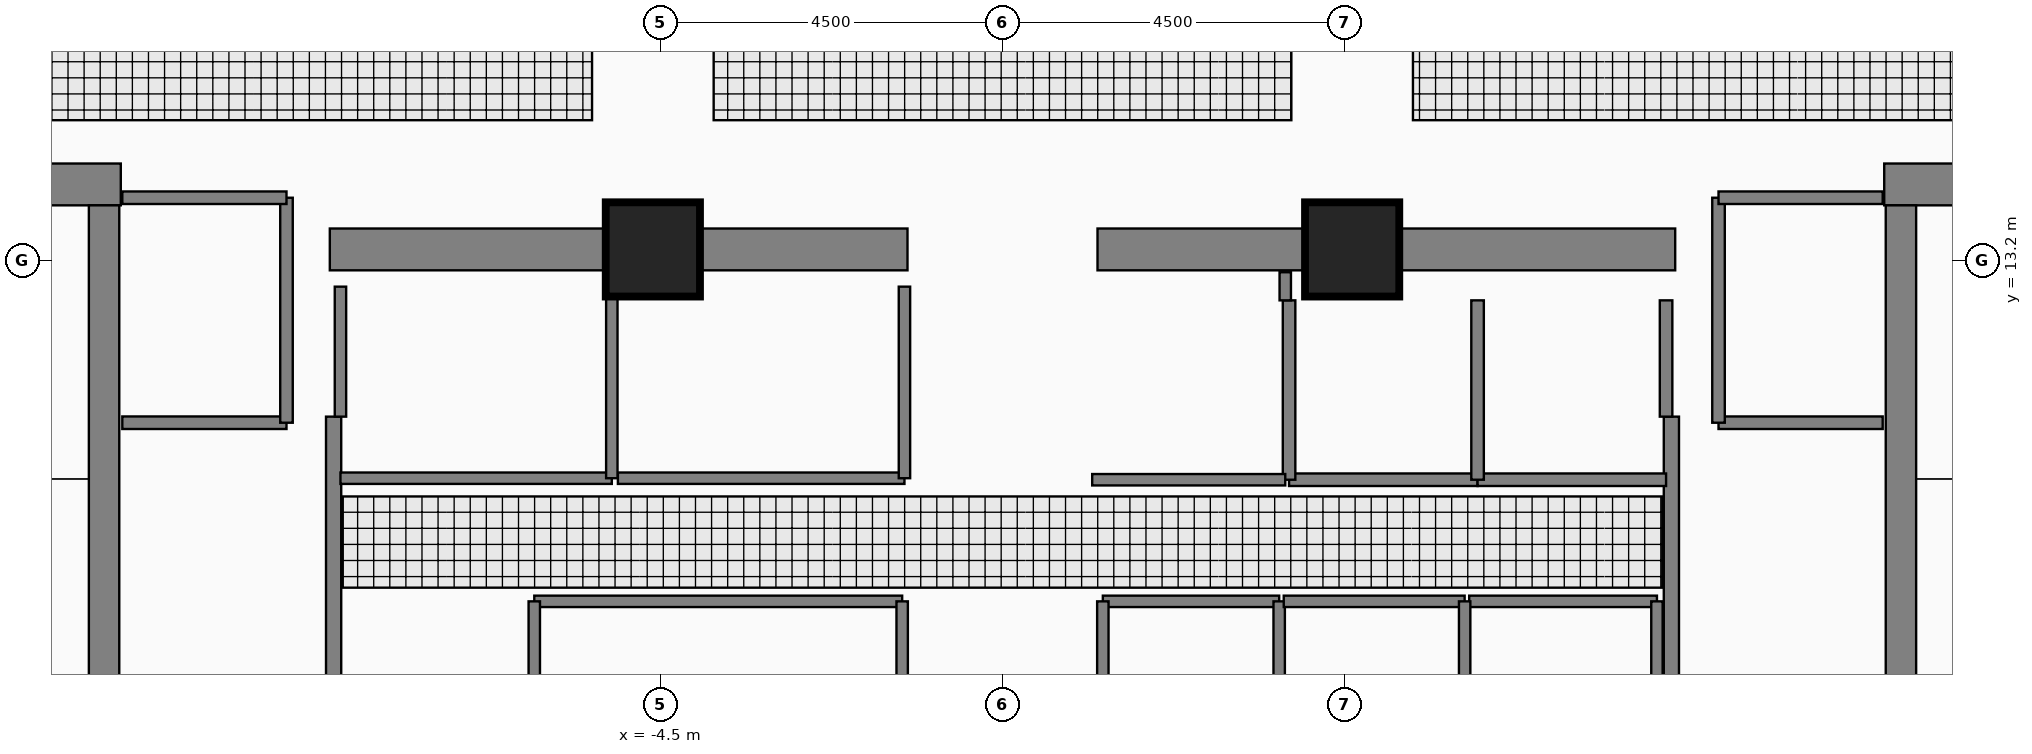
"""IFC4 building model, lengths in metres.
Left out: names, types, materials, properties, quantities, classifications, styles, units other than length and angle.
Written with IfcOpenShell. Run it as: python <this file> out.ifc"""

import sys

from ifc_helpers import new_model, si_unit, direction, frame, frame_2d, origin, origin_2d, place, context, subcontext, project, spatial, rectangle, extrude, element, fill, save


model = new_model("IFC4")
c1 = context("Model", 3, precision=1e-05, world=origin(), true_north=direction((0.0, 1.0)))
c2 = subcontext(c1, "Body", "Model", "MODEL_VIEW")
j1 = project(units=[si_unit("LENGTHUNIT", "METRE"), si_unit("PLANEANGLEUNIT", "RADIAN")], contexts=[c1])
p1 = place(None, origin())
s1 = spatial("IfcSite", under=j1, at=p1, CompositionType="ELEMENT")
p2 = place(p1, origin())
s2 = spatial("IfcBuilding", under=s1, at=p2, CompositionType="ELEMENT")
p3 = place(p2, frame((0.0, 0.0, 284.05)))
s3 = spatial("IfcBuildingStorey", under=s2, at=p3, CompositionType="ELEMENT", Elevation=284.05)
for number, where, z_axis, x_axis in (
    (1, (-15.96, 14.205, 0.0), (0.0, 0.0, 1.0), (1.0, 0.0, 0.0)),
    (2, (11.6, 14.205, 0.0), (0.0, 0.0, 1.0), (1.0, 0.0, 0.0)),
):
    element("IfcWall", number, at=place(p3, frame(where, z_axis=z_axis, x_axis=x_axis)), inside=s3, PredefinedType="SHEAR", context=c2, shape_type="SweptSolid", body=[
        extrude(rectangle(XDim=4.36, YDim=0.55, at=frame_2d((2.18, 0.0))), origin(), (0.0, 0.0, 1.0), 4.21),
    ])
for number, where, z_axis, x_axis in (
    (3, (-8.85, 13.35, 0.0), (0.0, 0.0, 1.0), (1.0, 0.0, 0.0)),
    (4, (1.25, 13.35, 0.0), (0.0, 0.0, 1.0), (1.0, 0.0, 0.0)),
):
    element("IfcWall", number, at=place(p3, frame(where, z_axis=z_axis, x_axis=x_axis)), inside=s3, PredefinedType="SHEAR", context=c2, shape_type="SweptSolid", body=[
        extrude(rectangle(XDim=7.6, YDim=0.55, at=frame_2d((3.8, 0.0))), origin(), (0.0, 0.0, 1.0), 4.18),
    ])
p4 = place(p3, frame((-11.82, 4.97, 0.0), z_axis=(0.0, 0.0, 1.0), x_axis=(0.0, 1.0, 0.0)))
e5 = element("IfcWall", 5, at=p4, inside=s3, PredefinedType="SHEAR", context=c2, shape_type="SweptSolid", body=[
    extrude(rectangle(XDim=8.96, YDim=0.4, at=frame_2d((4.48, 0.0))), origin(), (0.0, 0.0, 1.0), 4.21),
])
p5 = place(p4, frame((0.31, 0.0, 0.0)))
e6 = element("IfcOpeningElement", 6, at=p5, cuts=e5, PredefinedType="OPENING", context=c2, shape_type="SweptSolid", body=[
    extrude(rectangle(XDim=1.12, YDim=2.22, at=frame_2d((0.56, 1.11))), frame((0.0, 0.21, 0.0), z_axis=(0.0, -1.0, 0.0), x_axis=(1.0, 0.0, 0.0)), (0.0, 0.0, 1.0), 0.42),
])
p6 = place(p3, frame((11.82, 13.93, 0.0), z_axis=(0.0, 0.0, 1.0), x_axis=(0.0, -1.0, 0.0)))
e7 = element("IfcWall", 7, at=p6, inside=s3, PredefinedType="SHEAR", context=c2, shape_type="SweptSolid", body=[
    extrude(rectangle(XDim=8.96, YDim=0.4, at=frame_2d((4.48, 0.0))), origin(), (0.0, 0.0, 1.0), 4.21),
])
p7 = place(p6, frame((7.53, 0.0, 0.0)))
e8 = element("IfcOpeningElement", 8, at=p7, cuts=e7, PredefinedType="OPENING", context=c2, shape_type="SweptSolid", body=[
    extrude(rectangle(XDim=1.12, YDim=2.22, at=frame_2d((0.56, 1.11))), frame((0.0, 0.21, 0.0), z_axis=(0.0, -1.0, 0.0), x_axis=(1.0, 0.0, 0.0)), (0.0, 0.0, 1.0), 0.42),
])
for number, where, z_axis, x_axis in (
    (9, (-4.6, 13.35, 0.0), (0.0, 0.0, 1.0), (1.0, 0.0, 0.0)),
    (10, (4.6, 13.35, 0.0), (0.0, 0.0, 1.0), (1.0, 0.0, 0.0)),
):
    element("IfcColumn", number, at=place(p3, frame(where, z_axis=z_axis, x_axis=x_axis)), inside=s3, PredefinedType="COLUMN", context=c2, shape_type="SweptSolid", body=[
        extrude(rectangle(XDim=1.2, YDim=1.2, at=origin_2d()), origin(), (0.0, 0.0, 1.0), 4.4),
    ])
p8 = place(p3, frame((-8.8, 5.05, 0.0), z_axis=(0.0, 0.0, 1.0), x_axis=(0.0, 1.0, 0.0)))
e11 = element("IfcWall", 11, at=p8, inside=s3, PredefinedType="PARTITIONING", context=c2, shape_type="SweptSolid", body=[
    extrude(rectangle(XDim=6.1, YDim=0.2, at=frame_2d((3.05, 0.0))), origin(), (0.0, 0.0, 1.0), 4.18),
])
p9 = place(p8, frame((0.25, 0.0, 0.0)))
e12 = element("IfcOpeningElement", 12, at=p9, cuts=e11, PredefinedType="OPENING", context=c2, shape_type="SweptSolid", body=[
    extrude(rectangle(XDim=1.1, YDim=2.2, at=frame_2d((0.55, 1.1))), frame((0.0, 0.11, 0.0), z_axis=(0.0, -1.0, 0.0), x_axis=(1.0, 0.0, 0.0)), (0.0, 0.0, 1.0), 0.22),
])
p10 = place(p8, frame((3.85, 0.0, 0.0)))
e13 = element("IfcOpeningElement", 13, at=p10, cuts=e11, PredefinedType="OPENING", context=c2, shape_type="SweptSolid", body=[
    extrude(rectangle(XDim=1.1, YDim=2.2, at=frame_2d((0.55, 1.1))), frame((0.0, 0.11, 0.0), z_axis=(0.0, -1.0, 0.0), x_axis=(1.0, 0.0, 0.0)), (0.0, 0.0, 1.0), 0.22),
])
p11 = place(p3, frame((8.8, 11.15, 0.0), z_axis=(0.0, 0.0, 1.0), x_axis=(0.0, -1.0, 0.0)))
e14 = element("IfcWall", 14, at=p11, inside=s3, PredefinedType="PARTITIONING", context=c2, shape_type="SweptSolid", body=[
    extrude(rectangle(XDim=6.1, YDim=0.2, at=frame_2d((3.05, 0.0))), origin(), (0.0, 0.0, 1.0), 4.18),
])
p12 = place(p11, frame((1.15, 0.0, 0.0)))
e15 = element("IfcOpeningElement", 15, at=p12, cuts=e14, PredefinedType="OPENING", context=c2, shape_type="SweptSolid", body=[
    extrude(rectangle(XDim=1.1, YDim=2.2, at=frame_2d((0.55, 1.1))), frame((0.0, 0.11, 0.0), z_axis=(0.0, -1.0, 0.0), x_axis=(1.0, 0.0, 0.0)), (0.0, 0.0, 1.0), 0.22),
])
p13 = place(p11, frame((4.75, 0.0, 0.0)))
e16 = element("IfcOpeningElement", 16, at=p13, cuts=e14, PredefinedType="OPENING", context=c2, shape_type="SweptSolid", body=[
    extrude(rectangle(XDim=1.1, YDim=2.2, at=frame_2d((0.55, 1.1))), frame((0.0, 0.11, 0.0), z_axis=(0.0, -1.0, 0.0), x_axis=(1.0, 0.0, 0.0)), (0.0, 0.0, 1.0), 0.22),
])
p14 = place(p3, frame((-11.58, 11.07, 0.0), z_axis=(0.0, 0.0, 1.0), x_axis=(1.0, 0.0, 0.0)))
e17 = element("IfcWall", 17, at=p14, inside=s3, PredefinedType="PARTITIONING", context=c2, shape_type="SweptSolid", body=[
    extrude(rectangle(XDim=2.16, YDim=0.165, at=frame_2d((1.08, 0.0))), origin(), (0.0, 0.0, 1.0), 4.18),
])
p15 = place(p14, frame((0.53, 0.0, 0.0)))
e18 = element("IfcOpeningElement", 18, at=p15, cuts=e17, PredefinedType="OPENING", context=c2, shape_type="SweptSolid", body=[
    extrude(rectangle(XDim=1.15, YDim=2.25, at=frame_2d((0.575, 1.125))), frame((0.0, 0.093, 0.0), z_axis=(0.0, -1.0, 0.0), x_axis=(1.0, 0.0, 0.0)), (0.0, 0.0, 1.0), 0.185),
])
p16 = place(p3, frame((9.42, 11.07, 0.0), z_axis=(0.0, 0.0, 1.0), x_axis=(1.0, 0.0, 0.0)))
e19 = element("IfcWall", 19, at=p16, inside=s3, PredefinedType="PARTITIONING", context=c2, shape_type="SweptSolid", body=[
    extrude(rectangle(XDim=2.16, YDim=0.165, at=frame_2d((1.08, 0.0))), origin(), (0.0, 0.0, 1.0), 4.18),
])
p17 = place(p16, frame((0.53, 0.0, 0.0)))
e20 = element("IfcOpeningElement", 20, at=p17, cuts=e19, PredefinedType="OPENING", context=c2, shape_type="SweptSolid", body=[
    extrude(rectangle(XDim=1.15, YDim=2.25, at=frame_2d((0.575, 1.125))), frame((0.0, 0.093, 0.0), z_axis=(0.0, -1.0, 0.0), x_axis=(1.0, 0.0, 0.0)), (0.0, 0.0, 1.0), 0.185),
])
p18 = place(p3, frame((3.77, 10.32, 0.0), z_axis=(0.0, 0.0, 1.0), x_axis=(1.0, 0.0, 0.0)))
e21 = element("IfcWall", 21, at=p18, inside=s3, PredefinedType="PARTITIONING", context=c2, shape_type="SweptSolid", body=[
    extrude(rectangle(XDim=2.48, YDim=0.165, at=frame_2d((1.24, 0.0))), origin(), (0.0, 0.0, 1.0), 4.18),
])
p19 = place(p18, frame((0.69, 0.0, 0.0)))
e22 = element("IfcOpeningElement", 22, at=p19, cuts=e21, PredefinedType="OPENING", context=c2, shape_type="SweptSolid", body=[
    extrude(rectangle(XDim=1.1, YDim=2.25, at=frame_2d((0.55, 1.125))), frame((0.0, 0.093, 0.0), z_axis=(0.0, -1.0, 0.0), x_axis=(1.0, 0.0, 0.0)), (0.0, 0.0, 1.0), 0.185),
])
p20 = place(p3, frame((6.25, 10.32, 0.0), z_axis=(0.0, 0.0, 1.0), x_axis=(1.0, 0.0, 0.0)))
e23 = element("IfcWall", 23, at=p20, inside=s3, PredefinedType="PARTITIONING", context=c2, shape_type="SweptSolid", body=[
    extrude(rectangle(XDim=2.48, YDim=0.165, at=frame_2d((1.24, 0.0))), origin(), (0.0, 0.0, 1.0), 4.18),
])
p21 = place(p20, frame((0.69, 0.0, 0.0)))
e24 = element("IfcOpeningElement", 24, at=p21, cuts=e23, PredefinedType="OPENING", context=c2, shape_type="SweptSolid", body=[
    extrude(rectangle(XDim=1.1, YDim=2.25, at=frame_2d((0.55, 1.125))), frame((0.0, 0.093, 0.0), z_axis=(0.0, -1.0, 0.0), x_axis=(1.0, 0.0, 0.0)), (0.0, 0.0, 1.0), 0.185),
])
p22 = place(p3, frame((-8.71, 10.34, 0.0), z_axis=(0.0, 0.0, 1.0), x_axis=(1.0, 0.0, 0.0)))
e25 = element("IfcWall", 25, at=p22, inside=s3, PredefinedType="PARTITIONING", context=c2, shape_type="SweptSolid", body=[
    extrude(rectangle(XDim=3.57, YDim=0.15, at=frame_2d((1.785, 0.0))), origin(), (0.0, 0.0, 1.0), 4.18),
])
p23 = place(p22, frame((1.335, 0.0, 0.0)))
e26 = element("IfcOpeningElement", 26, at=p23, cuts=e25, PredefinedType="OPENING", context=c2, shape_type="SweptSolid", body=[
    extrude(rectangle(XDim=0.9, YDim=2.15, at=frame_2d((0.45, 1.075))), frame((0.0, 0.085, 0.0), z_axis=(0.0, -1.0, 0.0), x_axis=(1.0, 0.0, 0.0)), (0.0, 0.0, 1.0), 0.17),
])
p24 = place(p3, frame((-5.06, 10.34, 0.0), z_axis=(0.0, 0.0, 1.0), x_axis=(1.0, 0.0, 0.0)))
e27 = element("IfcWall", 27, at=p24, inside=s3, PredefinedType="PARTITIONING", context=c2, shape_type="SweptSolid", body=[
    extrude(rectangle(XDim=3.77, YDim=0.15, at=frame_2d((1.885, 0.0))), origin(), (0.0, 0.0, 1.0), 4.18),
])
p25 = place(p24, frame((1.435, 0.0, 0.0)))
e28 = element("IfcOpeningElement", 28, at=p25, cuts=e27, PredefinedType="OPENING", context=c2, shape_type="SweptSolid", body=[
    extrude(rectangle(XDim=0.9, YDim=2.15, at=frame_2d((0.45, 1.075))), frame((0.0, 0.085, 0.0), z_axis=(0.0, -1.0, 0.0), x_axis=(1.0, 0.0, 0.0)), (0.0, 0.0, 1.0), 0.17),
])
p26 = place(p3, frame((1.32, 8.72, 0.0), z_axis=(0.0, 0.0, 1.0), x_axis=(1.0, 0.0, 0.0)))
e29 = element("IfcWall", 29, at=p26, inside=s3, PredefinedType="PARTITIONING", context=c2, shape_type="SweptSolid", body=[
    extrude(rectangle(XDim=2.32, YDim=0.15, at=frame_2d((1.16, 0.0))), origin(), (0.0, 0.0, 1.0), 4.18),
])
p27 = place(p26, frame((0.71, 0.0, 0.0)))
e30 = element("IfcOpeningElement", 30, at=p27, cuts=e29, PredefinedType="OPENING", context=c2, shape_type="SweptSolid", body=[
    extrude(rectangle(XDim=0.9, YDim=2.15, at=frame_2d((0.45, 1.075))), frame((0.0, 0.085, 0.0), z_axis=(0.0, -1.0, 0.0), x_axis=(1.0, 0.0, 0.0)), (0.0, 0.0, 1.0), 0.17),
])
p28 = place(p3, frame((6.14, 8.72, 0.0), z_axis=(0.0, 0.0, 1.0), x_axis=(1.0, 0.0, 0.0)))
e31 = element("IfcWall", 31, at=p28, inside=s3, PredefinedType="PARTITIONING", context=c2, shape_type="SweptSolid", body=[
    extrude(rectangle(XDim=2.47, YDim=0.15, at=frame_2d((1.235, 0.0))), origin(), (0.0, 0.0, 1.0), 4.18),
])
p29 = place(p28, frame((0.785, 0.0, 0.0)))
e32 = element("IfcOpeningElement", 32, at=p29, cuts=e31, PredefinedType="OPENING", context=c2, shape_type="SweptSolid", body=[
    extrude(rectangle(XDim=0.9, YDim=2.15, at=frame_2d((0.45, 1.075))), frame((0.0, 0.085, 0.0), z_axis=(0.0, -1.0, 0.0), x_axis=(1.0, 0.0, 0.0)), (0.0, 0.0, 1.0), 0.17),
])
p30 = place(p3, frame((-9.42, 11.07, 0.0), z_axis=(0.0, 0.0, 1.0), x_axis=(0.0, 1.0, 0.0)))
e33 = element("IfcWall", 33, at=p30, inside=s3, PredefinedType="PARTITIONING", context=c2, shape_type="SweptSolid", body=[
    extrude(rectangle(XDim=2.96, YDim=0.165, at=frame_2d((1.48, 0.0))), origin(), (0.0, 0.0, 1.0), 4.18),
])
p31 = place(p3, frame((-11.58, 14.03, 0.0), z_axis=(0.0, 0.0, 1.0), x_axis=(1.0, 0.0, 0.0)))
e34 = element("IfcWall", 34, at=p31, inside=s3, PredefinedType="PARTITIONING", context=c2, shape_type="SweptSolid", body=[
    extrude(rectangle(XDim=2.16, YDim=0.165, at=frame_2d((1.08, 0.0))), origin(), (0.0, 0.0, 1.0), 4.18),
])
p32 = place(p3, frame((9.42, 11.07, 0.0), z_axis=(0.0, 0.0, 1.0), x_axis=(0.0, 1.0, 0.0)))
e35 = element("IfcWall", 35, at=p32, inside=s3, PredefinedType="PARTITIONING", context=c2, shape_type="SweptSolid", body=[
    extrude(rectangle(XDim=2.96, YDim=0.165, at=frame_2d((1.48, 0.0))), origin(), (0.0, 0.0, 1.0), 4.18),
])
p33 = place(p3, frame((9.42, 14.03, 0.0), z_axis=(0.0, 0.0, 1.0), x_axis=(1.0, 0.0, 0.0)))
e36 = element("IfcWall", 36, at=p33, inside=s3, PredefinedType="PARTITIONING", context=c2, shape_type="SweptSolid", body=[
    extrude(rectangle(XDim=2.16, YDim=0.165, at=frame_2d((1.08, 0.0))), origin(), (0.0, 0.0, 1.0), 4.18),
])
for number, where, z_axis, x_axis in (
    (37, (3.77, 10.32, 0.0), (0.0, 0.0, 1.0), (0.0, 1.0, 0.0)),
    (38, (6.25, 10.32, 0.0), (0.0, 0.0, 1.0), (0.0, 1.0, 0.0)),
):
    element("IfcWall", number, at=place(p3, frame(where, z_axis=z_axis, x_axis=x_axis)), inside=s3, PredefinedType="PARTITIONING", context=c2, shape_type="SweptSolid", body=[
        extrude(rectangle(XDim=2.36, YDim=0.165, at=frame_2d((1.18, 0.0))), origin(), (0.0, 0.0, 1.0), 4.18),
    ])
p34 = place(p3, frame((8.73, 11.15, 0.0), z_axis=(0.0, 0.0, 1.0), x_axis=(0.0, 1.0, 0.0)))
e39 = element("IfcWall", 39, at=p34, inside=s3, PredefinedType="PARTITIONING", context=c2, shape_type="SweptSolid", body=[
    extrude(rectangle(XDim=1.53, YDim=0.165, at=frame_2d((0.765, 0.0))), origin(), (0.0, 0.0, 1.0), 4.18),
])
p35 = place(p3, frame((-8.71, 11.15, 0.0), z_axis=(0.0, 0.0, 1.0), x_axis=(0.0, 1.0, 0.0)))
e40 = element("IfcWall", 40, at=p35, inside=s3, PredefinedType="PARTITIONING", context=c2, shape_type="SweptSolid", body=[
    extrude(rectangle(XDim=1.71, YDim=0.15, at=frame_2d((0.855, 0.0))), origin(), (0.0, 0.0, 1.0), 4.18),
])
for number, where, z_axis, x_axis in (
    (41, (-5.14, 10.34, 0.0), (0.0, 0.0, 1.0), (0.0, 1.0, 0.0)),
    (42, (-1.29, 10.34, 0.0), (0.0, 0.0, 1.0), (0.0, 1.0, 0.0)),
):
    element("IfcWall", number, at=place(p3, frame(where, z_axis=z_axis, x_axis=x_axis)), inside=s3, PredefinedType="PARTITIONING", context=c2, shape_type="SweptSolid", body=[
        extrude(rectangle(XDim=2.52, YDim=0.15, at=frame_2d((1.26, 0.0))), origin(), (0.0, 0.0, 1.0), 4.18),
    ])
p36 = place(p3, frame((-6.16, 8.72, 0.0), z_axis=(0.0, 0.0, 1.0), x_axis=(1.0, 0.0, 0.0)))
e43 = element("IfcWall", 43, at=p36, inside=s3, PredefinedType="PARTITIONING", context=c2, shape_type="SweptSolid", body=[
    extrude(rectangle(XDim=4.84, YDim=0.15, at=frame_2d((2.42, 0.0))), origin(), (0.0, 0.0, 1.0), 4.18),
])
for number, where, z_axis, x_axis in (
    (44, (-6.16, 6.48, 0.0), (0.0, 0.0, 1.0), (0.0, 1.0, 0.0)),
    (45, (-1.32, 6.48, 0.0), (0.0, 0.0, 1.0), (0.0, 1.0, 0.0)),
    (46, (1.32, 6.48, 0.0), (0.0, 0.0, 1.0), (0.0, 1.0, 0.0)),
    (47, (3.64, 6.48, 0.0), (0.0, 0.0, 1.0), (0.0, 1.0, 0.0)),
):
    element("IfcWall", number, at=place(p3, frame(where, z_axis=z_axis, x_axis=x_axis)), inside=s3, PredefinedType="PARTITIONING", context=c2, shape_type="SweptSolid", body=[
        extrude(rectangle(XDim=2.24, YDim=0.15, at=frame_2d((1.12, 0.0))), origin(), (0.0, 0.0, 1.0), 4.18),
    ])
p37 = place(p3, frame((3.7, 8.72, 0.0), z_axis=(0.0, 0.0, 1.0), x_axis=(1.0, 0.0, 0.0)))
e48 = element("IfcWall", 48, at=p37, inside=s3, PredefinedType="PARTITIONING", context=c2, shape_type="SweptSolid", body=[
    extrude(rectangle(XDim=2.38, YDim=0.15, at=frame_2d((1.19, 0.0))), origin(), (0.0, 0.0, 1.0), 4.18),
])
for number, where, z_axis, x_axis in (
    (49, (6.08, 6.48, 0.0), (0.0, 0.0, 1.0), (0.0, 1.0, 0.0)),
    (50, (8.61, 6.48, 0.0), (0.0, 0.0, 1.0), (0.0, 1.0, 0.0)),
):
    element("IfcWall", number, at=place(p3, frame(where, z_axis=z_axis, x_axis=x_axis)), inside=s3, PredefinedType="PARTITIONING", context=c2, shape_type="SweptSolid", body=[
        extrude(rectangle(XDim=2.24, YDim=0.15, at=frame_2d((1.12, 0.0))), origin(), (0.0, 0.0, 1.0), 4.18),
    ])
p38 = place(p3, frame((1.18, 10.32, 0.0), z_axis=(0.0, 0.0, 1.0), x_axis=(1.0, 0.0, 0.0)))
e51 = element("IfcWall", 51, at=p38, inside=s3, PredefinedType="PARTITIONING", context=c2, shape_type="SweptSolid", body=[
    extrude(rectangle(XDim=2.54, YDim=0.15, at=frame_2d((1.27, 0.0))), origin(), (0.0, 0.0, 1.0), 4.18),
])
p39 = place(p3, frame((3.72, 12.68, 0.0), z_axis=(0.0, 0.0, 1.0), x_axis=(0.0, 1.0, 0.0)))
e52 = element("IfcWall", 52, at=p39, inside=s3, PredefinedType="PARTITIONING", context=c2, shape_type="SweptSolid", body=[
    extrude(rectangle(XDim=0.37, YDim=0.15, at=frame_2d((0.185, 0.0))), origin(), (0.0, 0.0, 1.0), 4.18),
])
p40 = place(p10, origin())
e53 = element("IfcDoor", 53, at=p40, inside=s3, OperationType="SINGLE_SWING_RIGHT", PredefinedType="DOOR", context=c2, shape_type="SweptSolid", body=[
    extrude(rectangle(XDim=1.1, YDim=2.2, at=frame_2d((0.55, 1.1))), frame((0.0, 0.025, 0.0), z_axis=(0.0, -1.0, 0.0), x_axis=(1.0, 0.0, 0.0)), (0.0, 0.0, 1.0), 0.05),
])
fill(e13, e53)
p41 = place(p12, origin())
e54 = element("IfcDoor", 54, at=p41, inside=s3, OperationType="SINGLE_SWING_LEFT", PredefinedType="DOOR", context=c2, shape_type="SweptSolid", body=[
    extrude(rectangle(XDim=1.1, YDim=2.2, at=frame_2d((0.55, 1.1))), frame((0.0, 0.025, 0.0), z_axis=(0.0, -1.0, 0.0), x_axis=(1.0, 0.0, 0.0)), (0.0, 0.0, 1.0), 0.05),
])
fill(e15, e54)
p42 = place(p15, origin())
e55 = element("IfcDoor", 55, at=p42, inside=s3, OperationType="SLIDING_TO_LEFT", PredefinedType="DOOR", context=c2, shape_type="SweptSolid", body=[
    extrude(rectangle(XDim=1.15, YDim=2.25, at=frame_2d((0.575, 1.125))), frame((0.0, 0.025, 0.0), z_axis=(0.0, -1.0, 0.0), x_axis=(1.0, 0.0, 0.0)), (0.0, 0.0, 1.0), 0.05),
])
fill(e18, e55)
p43 = place(p17, origin())
e56 = element("IfcDoor", 56, at=p43, inside=s3, OperationType="SLIDING_TO_LEFT", PredefinedType="DOOR", context=c2, shape_type="SweptSolid", body=[
    extrude(rectangle(XDim=1.15, YDim=2.25, at=frame_2d((0.575, 1.125))), frame((0.0, 0.025, 0.0), z_axis=(0.0, -1.0, 0.0), x_axis=(1.0, 0.0, 0.0)), (0.0, 0.0, 1.0), 0.05),
])
fill(e20, e56)
p44 = place(p19, origin())
e57 = element("IfcDoor", 57, at=p44, inside=s3, OperationType="SLIDING_TO_LEFT", PredefinedType="DOOR", context=c2, shape_type="SweptSolid", body=[
    extrude(rectangle(XDim=1.1, YDim=2.25, at=frame_2d((0.55, 1.125))), frame((0.0, 0.025, 0.0), z_axis=(0.0, -1.0, 0.0), x_axis=(1.0, 0.0, 0.0)), (0.0, 0.0, 1.0), 0.05),
])
fill(e22, e57)
p45 = place(p21, origin())
e58 = element("IfcDoor", 58, at=p45, inside=s3, OperationType="SLIDING_TO_LEFT", PredefinedType="DOOR", context=c2, shape_type="SweptSolid", body=[
    extrude(rectangle(XDim=1.1, YDim=2.25, at=frame_2d((0.55, 1.125))), frame((0.0, 0.025, 0.0), z_axis=(0.0, -1.0, 0.0), x_axis=(1.0, 0.0, 0.0)), (0.0, 0.0, 1.0), 0.05),
])
fill(e24, e58)
p46 = place(p23, origin())
e59 = element("IfcDoor", 59, at=p46, inside=s3, OperationType="SINGLE_SWING_RIGHT", PredefinedType="DOOR", context=c2, shape_type="SweptSolid", body=[
    extrude(rectangle(XDim=0.9, YDim=2.15, at=frame_2d((0.45, 1.075))), frame((0.0, 0.025, 0.0), z_axis=(0.0, -1.0, 0.0), x_axis=(1.0, 0.0, 0.0)), (0.0, 0.0, 1.0), 0.05),
])
fill(e26, e59)
p47 = place(p25, origin())
e60 = element("IfcDoor", 60, at=p47, inside=s3, OperationType="SINGLE_SWING_LEFT", PredefinedType="DOOR", context=c2, shape_type="SweptSolid", body=[
    extrude(rectangle(XDim=0.9, YDim=2.15, at=frame_2d((0.45, 1.075))), frame((0.0, 0.025, 0.0), z_axis=(0.0, -1.0, 0.0), x_axis=(1.0, 0.0, 0.0)), (0.0, 0.0, 1.0), 0.05),
])
fill(e28, e60)
p48 = place(p27, origin())
e61 = element("IfcDoor", 61, at=p48, inside=s3, OperationType="SINGLE_SWING_LEFT", PredefinedType="DOOR", context=c2, shape_type="SweptSolid", body=[
    extrude(rectangle(XDim=0.9, YDim=2.15, at=frame_2d((0.45, 1.075))), frame((0.0, 0.025, 0.0), z_axis=(0.0, -1.0, 0.0), x_axis=(1.0, 0.0, 0.0)), (0.0, 0.0, 1.0), 0.05),
])
fill(e30, e61)
p49 = place(p29, origin())
e62 = element("IfcDoor", 62, at=p49, inside=s3, OperationType="SINGLE_SWING_LEFT", PredefinedType="DOOR", context=c2, shape_type="SweptSolid", body=[
    extrude(rectangle(XDim=0.9, YDim=2.15, at=frame_2d((0.45, 1.075))), frame((0.0, 0.025, 0.0), z_axis=(0.0, -1.0, 0.0), x_axis=(1.0, 0.0, 0.0)), (0.0, 0.0, 1.0), 0.05),
])
fill(e32, e62)
save(model, sys.argv[1])
